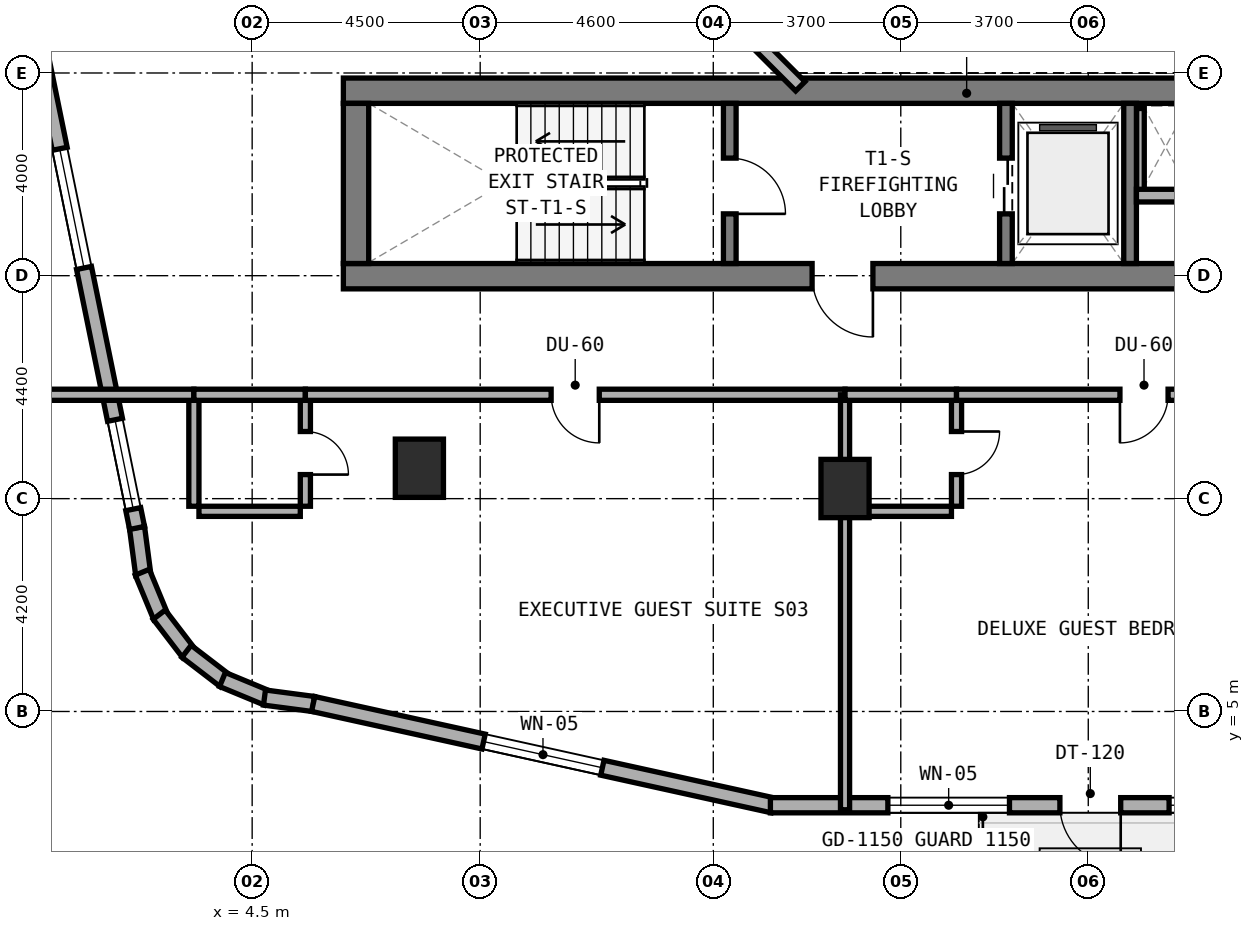
"""IFC4 building model, lengths in metres.
Left out: names, types, materials, properties, quantities, classifications, styles, units other than length and angle.
Written with IfcOpenShell. Run it as: python <this file> out.ifc"""

import sys

from ifc_helpers import new_model, si_unit, direction, frame, frame_2d, origin, origin_2d, place, context, subcontext, project, spatial, rectangle, extrude, element, fill, save


model = new_model("IFC4")
c1 = context("Model", 3, precision=1e-05, world=origin(), true_north=direction((0.0, 1.0)))
c2 = subcontext(c1, "Body", "Model", "MODEL_VIEW")
j1 = project(units=[si_unit("LENGTHUNIT", "METRE"), si_unit("PLANEANGLEUNIT", "RADIAN")], contexts=[c1])
p1 = place(None, origin())
s1 = spatial("IfcSite", under=j1, at=p1, CompositionType="ELEMENT")
p2 = place(p1, origin())
s2 = spatial("IfcBuilding", under=s1, at=p2, CompositionType="ELEMENT")
p3 = place(p2, frame((0.0, 0.0, 59.0)))
s3 = spatial("IfcBuildingStorey", under=s2, at=p3, CompositionType="ELEMENT", Elevation=59.0)
p4 = place(p3, frame((6.3, 13.59, 0.0), z_axis=(0.0, 0.0, 1.0), x_axis=(1.0, 0.0, 0.0)))
e1 = element("IfcWall", 1, at=p4, inside=s3, PredefinedType="SHEAR", context=c2, shape_type="SweptSolid", body=[
    extrude(rectangle(XDim=24.6, YDim=0.5, at=frame_2d((12.3, 0.0))), origin(), (0.0, 0.0, 1.0), 3.5),
])
p5 = place(p4, frame((9.25, 0.0, 0.0)))
e2 = element("IfcOpeningElement", 2, at=p5, cuts=e1, PredefinedType="OPENING", context=c2, shape_type="SweptSolid", body=[
    extrude(rectangle(XDim=1.2, YDim=2.15, at=frame_2d((0.6, 1.075))), frame((0.0, 0.26, 0.0), z_axis=(0.0, -1.0, 0.0), x_axis=(1.0, 0.0, 0.0)), (0.0, 0.0, 1.0), 0.52),
])
p6 = place(p4, frame((17.04, 0.0, 0.0)))
e3 = element("IfcOpeningElement", 3, at=p6, cuts=e1, PredefinedType="OPENING", context=c2, shape_type="SweptSolid", body=[
    extrude(rectangle(XDim=0.85, YDim=2.1, at=frame_2d((0.425, 1.05))), frame((0.0, 0.26, 0.0), z_axis=(0.0, -1.0, 0.0), x_axis=(1.0, 0.0, 0.0)), (0.0, 0.0, 1.0), 0.52),
])
p7 = place(p3, frame((6.3, 17.25, 0.0), z_axis=(0.0, 0.0, 1.0), x_axis=(1.0, 0.0, 0.0)))
e4 = element("IfcWall", 4, at=p7, inside=s3, PredefinedType="SHEAR", context=c2, shape_type="SweptSolid", body=[
    extrude(rectangle(XDim=24.6, YDim=0.5, at=frame_2d((12.3, 0.0))), origin(), (0.0, 0.0, 1.0), 3.5),
])
p8 = place(p3, frame((6.55, 13.84, 0.0), z_axis=(0.0, 0.0, 1.0), x_axis=(0.0, 1.0, 0.0)))
e5 = element("IfcWall", 5, at=p8, inside=s3, PredefinedType="SHEAR", context=c2, shape_type="SweptSolid", body=[
    extrude(rectangle(XDim=3.16, YDim=0.5, at=frame_2d((1.58, 0.0))), origin(), (0.0, 0.0, 1.0), 3.5),
])
p9 = place(p3, frame((13.925, 13.84, 0.0), z_axis=(0.0, 0.0, 1.0), x_axis=(0.0, 1.0, 0.0)))
e6 = element("IfcWall", 6, at=p9, inside=s3, PredefinedType="STANDARD", context=c2, shape_type="SweptSolid", body=[
    extrude(rectangle(XDim=3.16, YDim=0.25, at=frame_2d((1.58, 0.0))), origin(), (0.0, 0.0, 1.0), 3.22),
])
p10 = place(p9, frame((0.98, 0.0, 0.0)))
e7 = element("IfcOpeningElement", 7, at=p10, cuts=e6, PredefinedType="OPENING", context=c2, shape_type="SweptSolid", body=[
    extrude(rectangle(XDim=1.1, YDim=2.15, at=frame_2d((0.55, 1.075))), frame((0.0, 0.135, 0.0), z_axis=(0.0, -1.0, 0.0), x_axis=(1.0, 0.0, 0.0)), (0.0, 0.0, 1.0), 0.27),
])
p11 = place(p3, frame((19.375, 13.84, 0.0), z_axis=(0.0, 0.0, 1.0), x_axis=(0.0, 1.0, 0.0)))
e8 = element("IfcWall", 8, at=p11, inside=s3, PredefinedType="STANDARD", context=c2, shape_type="SweptSolid", body=[
    extrude(rectangle(XDim=3.16, YDim=0.25, at=frame_2d((1.58, 0.0))), origin(), (0.0, 0.0, 1.0), 3.22),
])
p12 = place(p11, frame((0.98, 0.0, 0.0)))
e9 = element("IfcOpeningElement", 9, at=p12, cuts=e8, PredefinedType="OPENING", context=c2, shape_type="SweptSolid", body=[
    extrude(rectangle(XDim=1.1, YDim=2.15, at=frame_2d((0.55, 1.075))), frame((0.0, 0.135, 0.0), z_axis=(0.0, -1.0, 0.0), x_axis=(1.0, 0.0, 0.0)), (0.0, 0.0, 1.0), 0.27),
])
p13 = place(p3, frame((21.825, 13.84, 0.0), z_axis=(0.0, 0.0, 1.0), x_axis=(0.0, 1.0, 0.0)))
e10 = element("IfcWall", 10, at=p13, inside=s3, PredefinedType="STANDARD", context=c2, shape_type="SweptSolid", body=[
    extrude(rectangle(XDim=3.16, YDim=0.25, at=frame_2d((1.58, 0.0))), origin(), (0.0, 0.0, 1.0), 3.22),
])
for number, where, z_axis, x_axis in (
    (11, (16.2, 9.4, 0.0), (0.0, 0.0, 1.0), (1.0, 0.0, 0.0)),
    (12, (7.8, 9.8, 0.0), (0.0, 0.0, 1.0), (1.0, 0.0, 0.0)),
):
    element("IfcColumn", number, at=place(p3, frame(where, z_axis=z_axis, x_axis=x_axis)), inside=s3, PredefinedType="COLUMN", context=c2, shape_type="SweptSolid", body=[
        extrude(rectangle(XDim=0.95, YDim=1.15, at=origin_2d()), origin(), (0.0, 0.0, 1.0), 3.5),
    ])
p14 = place(p3, frame((2.228, 8.628, 0.0), z_axis=(0.0, 0.0, 1.0), x_axis=(0.131174864804, -0.991359246108, 0.0)))
e13 = element("IfcWall", 13, at=p14, inside=s3, PredefinedType="STANDARD", context=c2, shape_type="SweptSolid", body=[
    extrude(rectangle(XDim=0.938, YDim=0.3, at=frame_2d((0.469, 0.0))), origin(), (0.0, 0.0, 1.0), 3.22),
])
p15 = place(p3, frame((2.332, 7.748, 0.0), z_axis=(0.0, 0.0, 1.0), x_axis=(0.382344263057, -0.924019948111, 0.0)))
e14 = element("IfcWall", 14, at=p15, inside=s3, PredefinedType="STANDARD", context=c2, shape_type="SweptSolid", body=[
    extrude(rectangle(XDim=0.955, YDim=0.3, at=frame_2d((0.477, 0.0))), origin(), (0.0, 0.0, 1.0), 3.22),
])
for number, where, z_axis, x_axis in (
    (15, (2.666, 6.911, 0.0), (0.0, 0.0, 1.0), (0.608, -0.794, 0.0)),
    (16, (3.205, 6.188, 0.0), (0.0, 0.0, 1.0), (0.794, -0.608, 0.0)),
):
    element("IfcWall", number, at=place(p3, frame(where, z_axis=z_axis, x_axis=x_axis)), inside=s3, PredefinedType="STANDARD", context=c2, shape_type="SweptSolid", body=[
        extrude(rectangle(XDim=0.955, YDim=0.3, at=frame_2d((0.478, 0.0))), origin(), (0.0, 0.0, 1.0), 3.22),
    ])
p16 = place(p3, frame((3.914, 5.631, 0.0), z_axis=(0.0, 0.0, 1.0), x_axis=(0.923982547689, -0.382434636986, 0.0)))
e17 = element("IfcWall", 17, at=p16, inside=s3, PredefinedType="STANDARD", context=c2, shape_type="SweptSolid", body=[
    extrude(rectangle(XDim=0.954, YDim=0.3, at=frame_2d((0.477, 0.0))), origin(), (0.0, 0.0, 1.0), 3.22),
])
p17 = place(p3, frame((4.743, 5.275, 0.0), z_axis=(0.0, 0.0, 1.0), x_axis=(0.99145856342, -0.130422072598, 0.0)))
e18 = element("IfcWall", 18, at=p17, inside=s3, PredefinedType="STANDARD", context=c2, shape_type="SweptSolid", body=[
    extrude(rectangle(XDim=0.973, YDim=0.3, at=frame_2d((0.487, 0.0))), origin(), (0.0, 0.0, 1.0), 3.22),
])
p18 = place(p3, frame((5.704, 5.148, 0.0), z_axis=(0.0, 0.0, 1.0), x_axis=(0.976539545934, -0.215338141596, 0.0)))
e19 = element("IfcWall", 19, at=p18, inside=s3, PredefinedType="STANDARD", context=c2, shape_type="SweptSolid", body=[
    extrude(rectangle(XDim=9.288, YDim=0.3, at=frame_2d((4.644, 0.0))), origin(), (0.0, 0.0, 1.0), 3.22),
])
p19 = place(p18, frame((3.444, 0.0, 0.8)))
e20 = element("IfcOpeningElement", 20, at=p19, cuts=e19, PredefinedType="OPENING", context=c2, shape_type="SweptSolid", body=[
    extrude(rectangle(XDim=2.4, YDim=1.6, at=frame_2d((1.2, 0.8))), frame((0.0, 0.16, 0.0), z_axis=(0.0, -1.0, 0.0), x_axis=(1.0, 0.0, 0.0)), (0.0, 0.0, 1.0), 0.32),
])
p20 = place(p3, frame((14.727, 3.15, 0.0), z_axis=(0.0, 0.0, 1.0), x_axis=(1.0, 0.0, 0.0)))
e21 = element("IfcWall", 21, at=p20, inside=s3, PredefinedType="STANDARD", context=c2, shape_type="SweptSolid", body=[
    extrude(rectangle(XDim=12.591, YDim=0.3, at=frame_2d((6.295, 0.0))), origin(), (0.0, 0.0, 1.0), 3.22),
])
p21 = place(p20, frame((5.713, 0.0, 0.0)))
e22 = element("IfcOpeningElement", 22, at=p21, cuts=e21, PredefinedType="OPENING", context=c2, shape_type="SweptSolid", body=[
    extrude(rectangle(XDim=1.2, YDim=2.15, at=frame_2d((0.6, 1.075))), frame((0.0, 0.16, 0.0), z_axis=(0.0, -1.0, 0.0), x_axis=(1.0, 0.0, 0.0)), (0.0, 0.0, 1.0), 0.32),
])
p22 = place(p20, frame((2.318, 0.0, 0.8)))
e23 = element("IfcOpeningElement", 23, at=p22, cuts=e21, PredefinedType="OPENING", context=c2, shape_type="SweptSolid", body=[
    extrude(rectangle(XDim=2.4, YDim=1.6, at=frame_2d((1.2, 0.8))), frame((0.0, 0.16, 0.0), z_axis=(0.0, -1.0, 0.0), x_axis=(1.0, 0.0, 0.0)), (0.0, 0.0, 1.0), 0.32),
])
p23 = place(p20, frame((7.868, 0.0, 0.8)))
e24 = element("IfcOpeningElement", 24, at=p23, cuts=e21, PredefinedType="OPENING", context=c2, shape_type="SweptSolid", body=[
    extrude(rectangle(XDim=2.4, YDim=1.6, at=frame_2d((1.2, 0.8))), frame((0.0, 0.16, 0.0), z_axis=(0.0, -1.0, 0.0), x_axis=(1.0, 0.0, 0.0)), (0.0, 0.0, 1.0), 0.32),
])
p24 = place(p3, frame((0.216, 18.484, 0.0), z_axis=(0.0, 0.0, 1.0), x_axis=(0.199990901713, -0.979797754249, 0.0)))
e25 = element("IfcWall", 25, at=p24, inside=s3, PredefinedType="STANDARD", context=c2, shape_type="SweptSolid", body=[
    extrude(rectangle(XDim=10.065, YDim=0.3, at=frame_2d((5.033, 0.0))), origin(), (0.0, 0.0, 1.0), 3.22),
])
p25 = place(p24, frame((2.429, 0.0, 0.8)))
e26 = element("IfcOpeningElement", 26, at=p25, cuts=e25, PredefinedType="OPENING", context=c2, shape_type="SweptSolid", body=[
    extrude(rectangle(XDim=2.4, YDim=1.6, at=frame_2d((1.2, 0.8))), frame((0.0, 0.16, 0.0), z_axis=(0.0, -1.0, 0.0), x_axis=(1.0, 0.0, 0.0)), (0.0, 0.0, 1.0), 0.32),
])
p26 = place(p24, frame((7.887, 0.0, 0.85)))
e27 = element("IfcOpeningElement", 27, at=p26, cuts=e25, PredefinedType="OPENING", context=c2, shape_type="SweptSolid", body=[
    extrude(rectangle(XDim=1.8, YDim=1.5, at=frame_2d((0.9, 0.75))), frame((0.0, 0.16, 0.0), z_axis=(0.0, -1.0, 0.0), x_axis=(1.0, 0.0, 0.0)), (0.0, 0.0, 1.0), 0.32),
])
p27 = place(p3, frame((13.484, 19.172, 0.0), z_axis=(0.0, 0.0, 1.0), x_axis=(0.707106781187, -0.707106781187, 0.0)))
e28 = element("IfcWall", 28, at=p27, inside=s3, PredefinedType="STANDARD", context=c2, shape_type="SweptSolid", body=[
    extrude(rectangle(XDim=2.594, YDim=0.26, at=frame_2d((1.297, 0.0))), origin(), (0.0, 0.0, 1.0), 3.22),
])
p28 = place(p3, frame((22.03, 15.28, 0.0), z_axis=(0.0, 0.0, 1.0), x_axis=(0.0, 1.0, 0.0)))
e29 = element("IfcWall", 29, at=p28, inside=s3, PredefinedType="PARTITIONING", context=c2, shape_type="SweptSolid", body=[
    extrude(rectangle(XDim=1.62, YDim=0.15, at=frame_2d((0.81, 0.0))), origin(), (0.0, 0.0, 1.0), 3.22),
])
p29 = place(p3, frame((21.95, 15.18, 0.0), z_axis=(0.0, 0.0, 1.0), x_axis=(1.0, 0.0, 0.0)))
e30 = element("IfcWall", 30, at=p29, inside=s3, PredefinedType="SOLIDWALL", context=c2, shape_type="SweptSolid", body=[
    extrude(rectangle(XDim=1.15, YDim=0.25, at=frame_2d((0.575, 0.0))), origin(), (0.0, 0.0, 1.0), 3.22),
])
p30 = place(p3, frame((5.55, 9.05, 0.0), z_axis=(0.0, 0.0, 1.0), x_axis=(0.0, 1.0, 0.0)))
e31 = element("IfcWall", 31, at=p30, inside=s3, PredefinedType="PLUMBINGWALL", context=c2, shape_type="SweptSolid", body=[
    extrude(rectangle(XDim=2.1, YDim=0.2, at=frame_2d((1.05, 0.0))), origin(), (0.0, 0.0, 1.0), 3.22),
])
p31 = place(p30, frame((0.625, 0.0, 0.0)))
e32 = element("IfcOpeningElement", 32, at=p31, cuts=e31, PredefinedType="OPENING", context=c2, shape_type="SweptSolid", body=[
    extrude(rectangle(XDim=0.85, YDim=2.1, at=frame_2d((0.425, 1.05))), frame((0.0, 0.11, 0.0), z_axis=(0.0, -1.0, 0.0), x_axis=(1.0, 0.0, 0.0)), (0.0, 0.0, 1.0), 0.22),
])
p32 = place(p3, frame((3.45, 8.95, 0.0), z_axis=(0.0, 0.0, 1.0), x_axis=(1.0, 0.0, 0.0)))
e33 = element("IfcWall", 33, at=p32, inside=s3, PredefinedType="PLUMBINGWALL", context=c2, shape_type="SweptSolid", body=[
    extrude(rectangle(XDim=2.0, YDim=0.2, at=frame_2d((1.0, 0.0))), origin(), (0.0, 0.0, 1.0), 3.22),
])
p33 = place(p3, frame((3.35, 9.05, 0.0), z_axis=(0.0, 0.0, 1.0), x_axis=(0.0, 1.0, 0.0)))
e34 = element("IfcWall", 34, at=p33, inside=s3, PredefinedType="PLUMBINGWALL", context=c2, shape_type="SweptSolid", body=[
    extrude(rectangle(XDim=2.1, YDim=0.2, at=frame_2d((1.05, 0.0))), origin(), (0.0, 0.0, 1.0), 3.22),
])
p34 = place(p3, frame((0.24, 11.25, 0.0), z_axis=(0.0, 0.0, 1.0), x_axis=(1.0, 0.0, 0.0)))
e35 = element("IfcWall", 35, at=p34, inside=s3, PredefinedType="SOLIDWALL", context=c2, shape_type="SweptSolid", body=[
    extrude(rectangle(XDim=3.11, YDim=0.22, at=frame_2d((1.555, 0.0))), origin(), (0.0, 0.0, 1.0), 3.22),
])
p35 = place(p3, frame((3.35, 11.25, 0.0), z_axis=(0.0, 0.0, 1.0), x_axis=(1.0, 0.0, 0.0)))
e36 = element("IfcWall", 36, at=p35, inside=s3, PredefinedType="SOLIDWALL", context=c2, shape_type="SweptSolid", body=[
    extrude(rectangle(XDim=2.2, YDim=0.22, at=frame_2d((1.1, 0.0))), origin(), (0.0, 0.0, 1.0), 3.22),
])
p36 = place(p3, frame((5.55, 11.25, 0.0), z_axis=(0.0, 0.0, 1.0), x_axis=(1.0, 0.0, 0.0)))
e37 = element("IfcWall", 37, at=p36, inside=s3, PredefinedType="SOLIDWALL", context=c2, shape_type="SweptSolid", body=[
    extrude(rectangle(XDim=10.65, YDim=0.22, at=frame_2d((5.325, 0.0))), origin(), (0.0, 0.0, 1.0), 2.495),
])
p37 = place(p36, frame((4.85, 0.0, 0.0)))
e38 = element("IfcOpeningElement", 38, at=p37, cuts=e37, PredefinedType="OPENING", context=c2, shape_type="SweptSolid", body=[
    extrude(rectangle(XDim=0.95, YDim=2.1, at=frame_2d((0.475, 1.05))), frame((0.0, 0.12, 0.0), z_axis=(0.0, -1.0, 0.0), x_axis=(1.0, 0.0, 0.0)), (0.0, 0.0, 1.0), 0.24),
])
p38 = place(p3, frame((16.2, 3.06, 0.0), z_axis=(0.0, 0.0, 1.0), x_axis=(0.0, 1.0, 0.0)))
e39 = element("IfcWall", 39, at=p38, inside=s3, PredefinedType="SOLIDWALL", context=c2, shape_type="SweptSolid", body=[
    extrude(rectangle(XDim=8.19, YDim=0.18, at=frame_2d((4.095, 0.0))), origin(), (0.0, 0.0, 1.0), 2.495),
])
p39 = place(p3, frame((18.4, 9.05, 0.0), z_axis=(0.0, 0.0, 1.0), x_axis=(0.0, 1.0, 0.0)))
e40 = element("IfcWall", 40, at=p39, inside=s3, PredefinedType="PLUMBINGWALL", context=c2, shape_type="SweptSolid", body=[
    extrude(rectangle(XDim=2.1, YDim=0.2, at=frame_2d((1.05, 0.0))), origin(), (0.0, 0.0, 1.0), 2.745),
])
p40 = place(p39, frame((0.625, 0.0, 0.0)))
e41 = element("IfcOpeningElement", 41, at=p40, cuts=e40, PredefinedType="OPENING", context=c2, shape_type="SweptSolid", body=[
    extrude(rectangle(XDim=0.85, YDim=2.1, at=frame_2d((0.425, 1.05))), frame((0.0, 0.11, 0.0), z_axis=(0.0, -1.0, 0.0), x_axis=(1.0, 0.0, 0.0)), (0.0, 0.0, 1.0), 0.22),
])
p41 = place(p3, frame((16.3, 8.95, 0.0), z_axis=(0.0, 0.0, 1.0), x_axis=(1.0, 0.0, 0.0)))
e42 = element("IfcWall", 42, at=p41, inside=s3, PredefinedType="PLUMBINGWALL", context=c2, shape_type="SweptSolid", body=[
    extrude(rectangle(XDim=2.0, YDim=0.2, at=frame_2d((1.0, 0.0))), origin(), (0.0, 0.0, 1.0), 3.22),
])
p42 = place(p3, frame((16.2, 11.25, 0.0), z_axis=(0.0, 0.0, 1.0), x_axis=(1.0, 0.0, 0.0)))
e43 = element("IfcWall", 43, at=p42, inside=s3, PredefinedType="SOLIDWALL", context=c2, shape_type="SweptSolid", body=[
    extrude(rectangle(XDim=2.2, YDim=0.22, at=frame_2d((1.1, 0.0))), origin(), (0.0, 0.0, 1.0), 2.495),
])
p43 = place(p3, frame((18.4, 11.25, 0.0), z_axis=(0.0, 0.0, 1.0), x_axis=(1.0, 0.0, 0.0)))
e44 = element("IfcWall", 44, at=p43, inside=s3, PredefinedType="SOLIDWALL", context=c2, shape_type="SweptSolid", body=[
    extrude(rectangle(XDim=7.4, YDim=0.22, at=frame_2d((3.7, 0.0))), origin(), (0.0, 0.0, 1.0), 2.495),
])
p44 = place(p43, frame((3.225, 0.0, 0.0)))
e45 = element("IfcOpeningElement", 45, at=p44, cuts=e44, PredefinedType="OPENING", context=c2, shape_type="SweptSolid", body=[
    extrude(rectangle(XDim=0.95, YDim=2.1, at=frame_2d((0.475, 1.05))), frame((0.0, 0.12, 0.0), z_axis=(0.0, -1.0, 0.0), x_axis=(1.0, 0.0, 0.0)), (0.0, 0.0, 1.0), 0.24),
])
p45 = place(p19, origin())
e46 = element("IfcWindow", 46, at=p45, inside=s3, PartitioningType="SINGLE_PANEL", PredefinedType="WINDOW", context=c2, shape_type="SweptSolid", body=[
    extrude(rectangle(XDim=2.4, YDim=1.6, at=frame_2d((1.2, 0.8))), frame((0.0, 0.03, 0.0), z_axis=(0.0, -1.0, 0.0), x_axis=(1.0, 0.0, 0.0)), (0.0, 0.0, 1.0), 0.06),
])
fill(e20, e46)
p46 = place(p21, frame((1.2, 0.0, 0.0), z_axis=(0.0, 0.0, 1.0), x_axis=(-1.0, 0.0, 0.0)))
e47 = element("IfcDoor", 47, at=p46, inside=s3, OperationType="SINGLE_SWING_LEFT", PredefinedType="DOOR", context=c2, shape_type="SweptSolid", body=[
    extrude(rectangle(XDim=1.2, YDim=2.15, at=frame_2d((0.6, 1.075))), frame((0.0, 0.025, 0.0), z_axis=(0.0, -1.0, 0.0), x_axis=(1.0, 0.0, 0.0)), (0.0, 0.0, 1.0), 0.05),
])
fill(e22, e47)
p47 = place(p22, origin())
e48 = element("IfcWindow", 48, at=p47, inside=s3, PartitioningType="SINGLE_PANEL", PredefinedType="WINDOW", context=c2, shape_type="SweptSolid", body=[
    extrude(rectangle(XDim=2.4, YDim=1.6, at=frame_2d((1.2, 0.8))), frame((0.0, 0.03, 0.0), z_axis=(0.0, -1.0, 0.0), x_axis=(1.0, 0.0, 0.0)), (0.0, 0.0, 1.0), 0.06),
])
fill(e23, e48)
p48 = place(p23, origin())
e49 = element("IfcWindow", 49, at=p48, inside=s3, PartitioningType="SINGLE_PANEL", PredefinedType="WINDOW", context=c2, shape_type="SweptSolid", body=[
    extrude(rectangle(XDim=2.4, YDim=1.6, at=frame_2d((1.2, 0.8))), frame((0.0, 0.03, 0.0), z_axis=(0.0, -1.0, 0.0), x_axis=(1.0, 0.0, 0.0)), (0.0, 0.0, 1.0), 0.06),
])
fill(e24, e49)
p49 = place(p25, origin())
e50 = element("IfcWindow", 50, at=p49, inside=s3, PartitioningType="SINGLE_PANEL", PredefinedType="WINDOW", context=c2, shape_type="SweptSolid", body=[
    extrude(rectangle(XDim=2.4, YDim=1.6, at=frame_2d((1.2, 0.8))), frame((0.0, 0.03, 0.0), z_axis=(0.0, -1.0, 0.0), x_axis=(1.0, 0.0, 0.0)), (0.0, 0.0, 1.0), 0.06),
])
fill(e26, e50)
p50 = place(p26, origin())
e51 = element("IfcWindow", 51, at=p50, inside=s3, PartitioningType="SINGLE_PANEL", PredefinedType="WINDOW", context=c2, shape_type="SweptSolid", body=[
    extrude(rectangle(XDim=1.8, YDim=1.5, at=frame_2d((0.9, 0.75))), frame((0.0, 0.03, 0.0), z_axis=(0.0, -1.0, 0.0), x_axis=(1.0, 0.0, 0.0)), (0.0, 0.0, 1.0), 0.06),
])
fill(e27, e51)
p51 = place(p10, frame((1.1, 0.0, 0.0), z_axis=(0.0, 0.0, 1.0), x_axis=(-1.0, 0.0, 0.0)))
e52 = element("IfcDoor", 52, at=p51, inside=s3, OperationType="SINGLE_SWING_RIGHT", PredefinedType="DOOR", context=c2, shape_type="SweptSolid", body=[
    extrude(rectangle(XDim=1.1, YDim=2.15, at=frame_2d((0.55, 1.075))), frame((0.0, 0.025, 0.0), z_axis=(0.0, -1.0, 0.0), x_axis=(1.0, 0.0, 0.0)), (0.0, 0.0, 1.0), 0.05),
])
fill(e7, e52)
p52 = place(p5, frame((1.2, 0.0, 0.0), z_axis=(0.0, 0.0, 1.0), x_axis=(-1.0, 0.0, 0.0)))
e53 = element("IfcDoor", 53, at=p52, inside=s3, OperationType="SINGLE_SWING_LEFT", PredefinedType="DOOR", context=c2, shape_type="SweptSolid", body=[
    extrude(rectangle(XDim=1.2, YDim=2.15, at=frame_2d((0.6, 1.075))), frame((0.0, 0.025, 0.0), z_axis=(0.0, -1.0, 0.0), x_axis=(1.0, 0.0, 0.0)), (0.0, 0.0, 1.0), 0.05),
])
fill(e2, e53)
p53 = place(p12, origin())
e54 = element("IfcDoor", 54, at=p53, inside=s3, OperationType="DOUBLE_DOOR_SLIDING", PredefinedType="DOOR", context=c2, shape_type="SweptSolid", body=[
    extrude(rectangle(XDim=1.1, YDim=2.15, at=frame_2d((0.55, 1.075))), frame((0.0, 0.025, 0.0), z_axis=(0.0, -1.0, 0.0), x_axis=(1.0, 0.0, 0.0)), (0.0, 0.0, 1.0), 0.05),
])
fill(e9, e54)
p54 = place(p31, frame((0.85, 0.0, 0.0), z_axis=(0.0, 0.0, 1.0), x_axis=(-1.0, 0.0, 0.0)))
e55 = element("IfcDoor", 55, at=p54, inside=s3, OperationType="SINGLE_SWING_RIGHT", PredefinedType="DOOR", context=c2, shape_type="SweptSolid", body=[
    extrude(rectangle(XDim=0.85, YDim=2.1, at=frame_2d((0.425, 1.05))), frame((0.0, 0.025, 0.0), z_axis=(0.0, -1.0, 0.0), x_axis=(1.0, 0.0, 0.0)), (0.0, 0.0, 1.0), 0.05),
])
fill(e32, e55)
p55 = place(p37, frame((0.95, 0.0, 0.0), z_axis=(0.0, 0.0, 1.0), x_axis=(-1.0, 0.0, 0.0)))
e56 = element("IfcDoor", 56, at=p55, inside=s3, OperationType="SINGLE_SWING_LEFT", PredefinedType="DOOR", context=c2, shape_type="SweptSolid", body=[
    extrude(rectangle(XDim=0.95, YDim=2.1, at=frame_2d((0.475, 1.05))), frame((0.0, 0.025, 0.0), z_axis=(0.0, -1.0, 0.0), x_axis=(1.0, 0.0, 0.0)), (0.0, 0.0, 1.0), 0.05),
])
fill(e38, e56)
p56 = place(p40, frame((0.85, 0.0, 0.0), z_axis=(0.0, 0.0, 1.0), x_axis=(-1.0, 0.0, 0.0)))
e57 = element("IfcDoor", 57, at=p56, inside=s3, OperationType="SINGLE_SWING_LEFT", PredefinedType="DOOR", context=c2, shape_type="SweptSolid", body=[
    extrude(rectangle(XDim=0.85, YDim=2.1, at=frame_2d((0.425, 1.05))), frame((0.0, 0.025, 0.0), z_axis=(0.0, -1.0, 0.0), x_axis=(1.0, 0.0, 0.0)), (0.0, 0.0, 1.0), 0.05),
])
fill(e41, e57)
p57 = place(p44, frame((0.95, 0.0, 0.0), z_axis=(0.0, 0.0, 1.0), x_axis=(-1.0, 0.0, 0.0)))
e58 = element("IfcDoor", 58, at=p57, inside=s3, OperationType="SINGLE_SWING_RIGHT", PredefinedType="DOOR", context=c2, shape_type="SweptSolid", body=[
    extrude(rectangle(XDim=0.95, YDim=2.1, at=frame_2d((0.475, 1.05))), frame((0.0, 0.025, 0.0), z_axis=(0.0, -1.0, 0.0), x_axis=(1.0, 0.0, 0.0)), (0.0, 0.0, 1.0), 0.05),
])
fill(e45, e58)
save(model, sys.argv[1])
